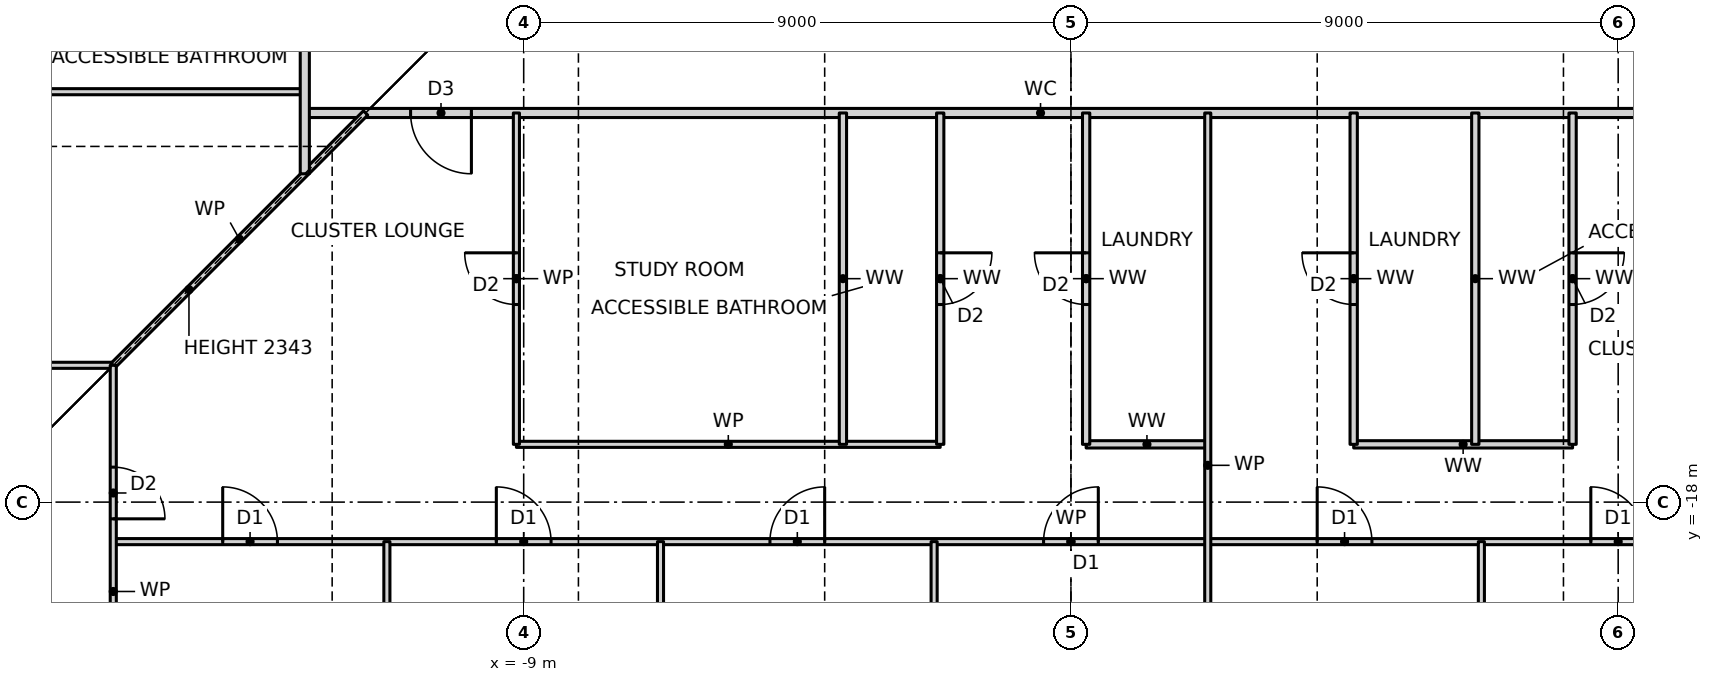
"""IFC4 building model, lengths in metres.
Left out: names, types, materials, properties, quantities, classifications, styles, units other than length and angle.
Written with IfcOpenShell. Run it as: python <this file> out.ifc"""

import sys

from ifc_helpers import new_model, si_unit, direction, frame, frame_2d, origin, place, context, subcontext, project, spatial, rectangle, extrude, element, fill, save


model = new_model("IFC4")
c1 = context("Model", 3, precision=1e-05, world=origin(), true_north=direction((0.0, 1.0)))
c2 = subcontext(c1, "Body", "Model", "MODEL_VIEW")
j1 = project(units=[si_unit("LENGTHUNIT", "METRE"), si_unit("PLANEANGLEUNIT", "RADIAN")], contexts=[c1])
p1 = place(None, origin())
s1 = spatial("IfcSite", under=j1, at=p1, CompositionType="ELEMENT")
p2 = place(p1, origin())
s2 = spatial("IfcBuilding", under=s1, at=p2, CompositionType="ELEMENT")
p3 = place(p2, frame((0.0, 0.0, 53.5)))
s3 = spatial("IfcBuildingStorey", under=s2, at=p3, CompositionType="ELEMENT", Elevation=53.5)
p4 = place(p3, frame((-15.75, -18.65, 0.0), z_axis=(0.0, 0.0, 1.0), x_axis=(1.0, 0.0, 0.0)))
e1 = element("IfcWall", 1, at=p4, inside=s3, PredefinedType="PARTITIONING", context=c2, shape_type="SweptSolid", body=[
    extrude(rectangle(XDim=31.5, YDim=0.1, at=frame_2d((15.75, 0.0))), origin(), (0.0, 0.0, 1.0), 3.27),
])
p5 = place(p4, frame((1.8, 0.0, 0.0)))
e2 = element("IfcOpeningElement", 2, at=p5, cuts=e1, PredefinedType="OPENING", context=c2, shape_type="SweptSolid", body=[
    extrude(rectangle(XDim=0.9, YDim=2.1, at=frame_2d((0.45, 1.05))), frame((0.0, 0.06, 0.0), z_axis=(0.0, -1.0, 0.0), x_axis=(1.0, 0.0, 0.0)), (0.0, 0.0, 1.0), 0.12),
])
p6 = place(p4, frame((6.3, 0.0, 0.0)))
e3 = element("IfcOpeningElement", 3, at=p6, cuts=e1, PredefinedType="OPENING", context=c2, shape_type="SweptSolid", body=[
    extrude(rectangle(XDim=0.9, YDim=2.1, at=frame_2d((0.45, 1.05))), frame((0.0, 0.06, 0.0), z_axis=(0.0, -1.0, 0.0), x_axis=(1.0, 0.0, 0.0)), (0.0, 0.0, 1.0), 0.12),
])
p7 = place(p4, frame((10.8, 0.0, 0.0)))
e4 = element("IfcOpeningElement", 4, at=p7, cuts=e1, PredefinedType="OPENING", context=c2, shape_type="SweptSolid", body=[
    extrude(rectangle(XDim=0.9, YDim=2.1, at=frame_2d((0.45, 1.05))), frame((0.0, 0.06, 0.0), z_axis=(0.0, -1.0, 0.0), x_axis=(1.0, 0.0, 0.0)), (0.0, 0.0, 1.0), 0.12),
])
p8 = place(p4, frame((15.3, 0.0, 0.0)))
e5 = element("IfcOpeningElement", 5, at=p8, cuts=e1, PredefinedType="OPENING", context=c2, shape_type="SweptSolid", body=[
    extrude(rectangle(XDim=0.9, YDim=2.1, at=frame_2d((0.45, 1.05))), frame((0.0, 0.06, 0.0), z_axis=(0.0, -1.0, 0.0), x_axis=(1.0, 0.0, 0.0)), (0.0, 0.0, 1.0), 0.12),
])
p9 = place(p4, frame((19.8, 0.0, 0.0)))
e6 = element("IfcOpeningElement", 6, at=p9, cuts=e1, PredefinedType="OPENING", context=c2, shape_type="SweptSolid", body=[
    extrude(rectangle(XDim=0.9, YDim=2.1, at=frame_2d((0.45, 1.05))), frame((0.0, 0.06, 0.0), z_axis=(0.0, -1.0, 0.0), x_axis=(1.0, 0.0, 0.0)), (0.0, 0.0, 1.0), 0.12),
])
p10 = place(p4, frame((24.3, 0.0, 0.0)))
e7 = element("IfcOpeningElement", 7, at=p10, cuts=e1, PredefinedType="OPENING", context=c2, shape_type="SweptSolid", body=[
    extrude(rectangle(XDim=0.9, YDim=2.1, at=frame_2d((0.45, 1.05))), frame((0.0, 0.06, 0.0), z_axis=(0.0, -1.0, 0.0), x_axis=(1.0, 0.0, 0.0)), (0.0, 0.0, 1.0), 0.12),
])
p11 = place(p4, frame((28.8, 0.0, 0.0)))
e8 = element("IfcOpeningElement", 8, at=p11, cuts=e1, PredefinedType="OPENING", context=c2, shape_type="SweptSolid", body=[
    extrude(rectangle(XDim=0.9, YDim=2.1, at=frame_2d((0.45, 1.05))), frame((0.0, 0.06, 0.0), z_axis=(0.0, -1.0, 0.0), x_axis=(1.0, 0.0, 0.0)), (0.0, 0.0, 1.0), 0.12),
])
p12 = place(p3, frame((-9.12, -17.05, 0.0), z_axis=(0.0, 0.0, 1.0), x_axis=(1.0, 0.0, 0.0)))
e9 = element("IfcWall", 9, at=p12, inside=s3, PredefinedType="PARTITIONING", context=c2, shape_type="SweptSolid", body=[
    extrude(rectangle(XDim=6.97, YDim=0.1, at=frame_2d((3.485, 0.0))), origin(), (0.0, 0.0, 1.0), 3.27),
])
p13 = place(p3, frame((0.25, -17.05, 0.0), z_axis=(0.0, 0.0, 1.0), x_axis=(1.0, 0.0, 0.0)))
e10 = element("IfcWall", 10, at=p13, inside=s3, PredefinedType="PARTITIONING", context=c2, shape_type="SweptSolid", body=[
    extrude(rectangle(XDim=2.0, YDim=0.12, at=frame_2d((1.0, 0.0))), origin(), (0.0, 0.0, 1.0), 3.27),
])
p14 = place(p3, frame((4.65, -17.05, 0.0), z_axis=(0.0, 0.0, 1.0), x_axis=(1.0, 0.0, 0.0)))
e11 = element("IfcWall", 11, at=p14, inside=s3, PredefinedType="PARTITIONING", context=c2, shape_type="SweptSolid", body=[
    extrude(rectangle(XDim=3.6, YDim=0.12, at=frame_2d((1.8, 0.0))), origin(), (0.0, 0.0, 1.0), 3.27),
])
p15 = place(p3, frame((-23.19, -15.75, 0.0), z_axis=(0.0, 0.0, 1.0), x_axis=(1.0, 0.0, 0.0)))
e12 = element("IfcWall", 12, at=p15, inside=s3, PredefinedType="PARTITIONING", context=c2, shape_type="SweptSolid", body=[
    extrude(rectangle(XDim=7.44, YDim=0.1, at=frame_2d((3.72, 0.0))), origin(), (0.0, 0.0, 1.0), 3.27),
])
p16 = place(p3, frame((-12.6, -11.6, 0.0), z_axis=(0.0, 0.0, 1.0), x_axis=(1.0, 0.0, 0.0)))
e13 = element("IfcWall", 13, at=p16, inside=s3, PredefinedType="PARTITIONING", context=c2, shape_type="SweptSolid", body=[
    extrude(rectangle(XDim=24.2, YDim=0.15, at=frame_2d((12.1, 0.0))), origin(), (0.0, 0.0, 1.0), 3.27),
])
p17 = place(p16, frame((1.74, 0.0, 0.0)))
e14 = element("IfcOpeningElement", 14, at=p17, cuts=e13, PredefinedType="OPENING", context=c2, shape_type="SweptSolid", body=[
    extrude(rectangle(XDim=1.0, YDim=2.1, at=frame_2d((0.5, 1.05))), frame((0.0, 0.085, 0.0), z_axis=(0.0, -1.0, 0.0), x_axis=(1.0, 0.0, 0.0)), (0.0, 0.0, 1.0), 0.17),
])
p18 = place(p16, frame((22.025, 0.0, 0.0)))
e15 = element("IfcOpeningElement", 15, at=p18, cuts=e13, PredefinedType="OPENING", context=c2, shape_type="SweptSolid", body=[
    extrude(rectangle(XDim=1.0, YDim=2.1, at=frame_2d((0.5, 1.05))), frame((0.0, 0.085, 0.0), z_axis=(0.0, -1.0, 0.0), x_axis=(1.0, 0.0, 0.0)), (0.0, 0.0, 1.0), 0.17),
])
p19 = place(p3, frame((-23.19, -11.25, 0.0), z_axis=(0.0, 0.0, 1.0), x_axis=(1.0, 0.0, 0.0)))
e16 = element("IfcWall", 16, at=p19, inside=s3, PredefinedType="PARTITIONING", context=c2, shape_type="SweptSolid", body=[
    extrude(rectangle(XDim=10.59, YDim=0.1, at=frame_2d((5.295, 0.0))), origin(), (0.0, 0.0, 1.0), 3.27),
])
p20 = place(p19, frame((4.915, 0.0, 0.0)))
e17 = element("IfcOpeningElement", 17, at=p20, cuts=e16, PredefinedType="OPENING", context=c2, shape_type="SweptSolid", body=[
    extrude(rectangle(XDim=0.85, YDim=2.1, at=frame_2d((0.425, 1.05))), frame((0.0, 0.06, 0.0), z_axis=(0.0, -1.0, 0.0), x_axis=(1.0, 0.0, 0.0)), (0.0, 0.0, 1.0), 0.12),
])
p21 = place(p3, frame((-15.75, -15.75, 0.0), z_axis=(0.0, 0.0, 1.0), x_axis=(0.707106781187, 0.707106781187, 0.0)))
e18 = element("IfcWall", 18, at=p21, inside=s3, PredefinedType="PARTITIONING", context=c2, shape_type="SweptSolid", body=[
    extrude(rectangle(XDim=5.869, YDim=0.1, at=frame_2d((2.935, 0.0))), origin(), (0.0, 0.0, 1.0), 2.343),
])
p22 = place(p3, frame((8.25, -17.05, 0.0), z_axis=(0.0, 0.0, 1.0), x_axis=(0.0, 1.0, 0.0)))
e19 = element("IfcWall", 19, at=p22, inside=s3, PredefinedType="PARTITIONING", context=c2, shape_type="SweptSolid", body=[
    extrude(rectangle(XDim=5.45, YDim=0.12, at=frame_2d((2.725, 0.0))), origin(), (0.0, 0.0, 1.0), 3.27),
])
p23 = place(p22, frame((2.3, 0.0, 0.0)))
e20 = element("IfcOpeningElement", 20, at=p23, cuts=e19, PredefinedType="OPENING", context=c2, shape_type="SweptSolid", body=[
    extrude(rectangle(XDim=0.85, YDim=2.1, at=frame_2d((0.425, 1.05))), frame((0.0, 0.07, 0.0), z_axis=(0.0, -1.0, 0.0), x_axis=(1.0, 0.0, 0.0)), (0.0, 0.0, 1.0), 0.14),
])
p24 = place(p3, frame((6.75, -23.19, 0.0), z_axis=(0.0, 0.0, 1.0), x_axis=(0.0, 1.0, 0.0)))
e21 = element("IfcWall", 21, at=p24, inside=s3, PredefinedType="PARTITIONING", context=c2, shape_type="SweptSolid", body=[
    extrude(rectangle(XDim=4.54, YDim=0.1, at=frame_2d((2.27, 0.0))), origin(), (0.0, 0.0, 1.0), 3.27),
])
p25 = place(p3, frame((6.65, -17.05, 0.0), z_axis=(0.0, 0.0, 1.0), x_axis=(0.0, 1.0, 0.0)))
e22 = element("IfcWall", 22, at=p25, inside=s3, PredefinedType="PARTITIONING", context=c2, shape_type="SweptSolid", body=[
    extrude(rectangle(XDim=5.45, YDim=0.12, at=frame_2d((2.725, 0.0))), origin(), (0.0, 0.0, 1.0), 3.27),
])
p26 = place(p3, frame((4.65, -17.05, 0.0), z_axis=(0.0, 0.0, 1.0), x_axis=(0.0, 1.0, 0.0)))
e23 = element("IfcWall", 23, at=p26, inside=s3, PredefinedType="PARTITIONING", context=c2, shape_type="SweptSolid", body=[
    extrude(rectangle(XDim=5.45, YDim=0.12, at=frame_2d((2.725, 0.0))), origin(), (0.0, 0.0, 1.0), 3.27),
])
p27 = place(p26, frame((2.3, 0.0, 0.0)))
e24 = element("IfcOpeningElement", 24, at=p27, cuts=e23, PredefinedType="OPENING", context=c2, shape_type="SweptSolid", body=[
    extrude(rectangle(XDim=0.85, YDim=2.1, at=frame_2d((0.425, 1.05))), frame((0.0, 0.07, 0.0), z_axis=(0.0, -1.0, 0.0), x_axis=(1.0, 0.0, 0.0)), (0.0, 0.0, 1.0), 0.14),
])
p28 = place(p3, frame((2.25, -23.19, 0.0), z_axis=(0.0, 0.0, 1.0), x_axis=(0.0, 1.0, 0.0)))
e25 = element("IfcWall", 25, at=p28, inside=s3, PredefinedType="PARTITIONING", context=c2, shape_type="SweptSolid", body=[
    extrude(rectangle(XDim=11.59, YDim=0.1, at=frame_2d((5.795, 0.0))), origin(), (0.0, 0.0, 1.0), 3.27),
])
p29 = place(p3, frame((0.25, -17.05, 0.0), z_axis=(0.0, 0.0, 1.0), x_axis=(0.0, 1.0, 0.0)))
e26 = element("IfcWall", 26, at=p29, inside=s3, PredefinedType="PARTITIONING", context=c2, shape_type="SweptSolid", body=[
    extrude(rectangle(XDim=5.45, YDim=0.12, at=frame_2d((2.725, 0.0))), origin(), (0.0, 0.0, 1.0), 3.27),
])
p30 = place(p29, frame((2.3, 0.0, 0.0)))
e27 = element("IfcOpeningElement", 27, at=p30, cuts=e26, PredefinedType="OPENING", context=c2, shape_type="SweptSolid", body=[
    extrude(rectangle(XDim=0.85, YDim=2.1, at=frame_2d((0.425, 1.05))), frame((0.0, 0.07, 0.0), z_axis=(0.0, -1.0, 0.0), x_axis=(1.0, 0.0, 0.0)), (0.0, 0.0, 1.0), 0.14),
])
p31 = place(p3, frame((-2.15, -17.05, 0.0), z_axis=(0.0, 0.0, 1.0), x_axis=(0.0, 1.0, 0.0)))
e28 = element("IfcWall", 28, at=p31, inside=s3, PredefinedType="PARTITIONING", context=c2, shape_type="SweptSolid", body=[
    extrude(rectangle(XDim=5.45, YDim=0.12, at=frame_2d((2.725, 0.0))), origin(), (0.0, 0.0, 1.0), 3.27),
])
p32 = place(p31, frame((2.3, 0.0, 0.0)))
e29 = element("IfcOpeningElement", 29, at=p32, cuts=e28, PredefinedType="OPENING", context=c2, shape_type="SweptSolid", body=[
    extrude(rectangle(XDim=0.85, YDim=2.1, at=frame_2d((0.425, 1.05))), frame((0.0, 0.07, 0.0), z_axis=(0.0, -1.0, 0.0), x_axis=(1.0, 0.0, 0.0)), (0.0, 0.0, 1.0), 0.14),
])
p33 = place(p3, frame((-2.25, -23.19, 0.0), z_axis=(0.0, 0.0, 1.0), x_axis=(0.0, 1.0, 0.0)))
e30 = element("IfcWall", 30, at=p33, inside=s3, PredefinedType="PARTITIONING", context=c2, shape_type="SweptSolid", body=[
    extrude(rectangle(XDim=4.54, YDim=0.1, at=frame_2d((2.27, 0.0))), origin(), (0.0, 0.0, 1.0), 3.27),
])
p34 = place(p3, frame((-3.75, -17.05, 0.0), z_axis=(0.0, 0.0, 1.0), x_axis=(0.0, 1.0, 0.0)))
e31 = element("IfcWall", 31, at=p34, inside=s3, PredefinedType="PARTITIONING", context=c2, shape_type="SweptSolid", body=[
    extrude(rectangle(XDim=5.45, YDim=0.12, at=frame_2d((2.725, 0.0))), origin(), (0.0, 0.0, 1.0), 3.27),
])
p35 = place(p3, frame((-6.75, -23.19, 0.0), z_axis=(0.0, 0.0, 1.0), x_axis=(0.0, 1.0, 0.0)))
e32 = element("IfcWall", 32, at=p35, inside=s3, PredefinedType="PARTITIONING", context=c2, shape_type="SweptSolid", body=[
    extrude(rectangle(XDim=4.54, YDim=0.1, at=frame_2d((2.27, 0.0))), origin(), (0.0, 0.0, 1.0), 3.27),
])
p36 = place(p3, frame((-9.12, -17.05, 0.0), z_axis=(0.0, 0.0, 1.0), x_axis=(0.0, 1.0, 0.0)))
e33 = element("IfcWall", 33, at=p36, inside=s3, PredefinedType="PARTITIONING", context=c2, shape_type="SweptSolid", body=[
    extrude(rectangle(XDim=5.45, YDim=0.1, at=frame_2d((2.725, 0.0))), origin(), (0.0, 0.0, 1.0), 3.27),
])
p37 = place(p36, frame((2.3, 0.0, 0.0)))
e34 = element("IfcOpeningElement", 34, at=p37, cuts=e33, PredefinedType="OPENING", context=c2, shape_type="SweptSolid", body=[
    extrude(rectangle(XDim=0.85, YDim=2.1, at=frame_2d((0.425, 1.05))), frame((0.0, 0.06, 0.0), z_axis=(0.0, -1.0, 0.0), x_axis=(1.0, 0.0, 0.0)), (0.0, 0.0, 1.0), 0.12),
])
p38 = place(p3, frame((-11.25, -23.19, 0.0), z_axis=(0.0, 0.0, 1.0), x_axis=(0.0, 1.0, 0.0)))
e35 = element("IfcWall", 35, at=p38, inside=s3, PredefinedType="PARTITIONING", context=c2, shape_type="SweptSolid", body=[
    extrude(rectangle(XDim=4.54, YDim=0.1, at=frame_2d((2.27, 0.0))), origin(), (0.0, 0.0, 1.0), 3.27),
])
p39 = place(p3, frame((-12.6, -12.6, 0.0), z_axis=(0.0, 0.0, 1.0), x_axis=(0.0, 1.0, 0.0)))
e36 = element("IfcWall", 36, at=p39, inside=s3, PredefinedType="PARTITIONING", context=c2, shape_type="SweptSolid", body=[
    extrude(rectangle(XDim=25.2, YDim=0.15, at=frame_2d((12.6, 0.0))), origin(), (0.0, 0.0, 1.0), 3.27),
])
p40 = place(p39, frame((7.15, 0.0, 0.0)))
e37 = element("IfcOpeningElement", 37, at=p40, cuts=e36, PredefinedType="OPENING", context=c2, shape_type="SweptSolid", body=[
    extrude(rectangle(XDim=1.0, YDim=2.1, at=frame_2d((0.5, 1.05))), frame((0.0, 0.085, 0.0), z_axis=(0.0, -1.0, 0.0), x_axis=(1.0, 0.0, 0.0)), (0.0, 0.0, 1.0), 0.17),
])
p41 = place(p3, frame((-15.75, -23.19, 0.0), z_axis=(0.0, 0.0, 1.0), x_axis=(0.0, 1.0, 0.0)))
e38 = element("IfcWall", 38, at=p41, inside=s3, PredefinedType="PARTITIONING", context=c2, shape_type="SweptSolid", body=[
    extrude(rectangle(XDim=7.44, YDim=0.1, at=frame_2d((3.72, 0.0))), origin(), (0.0, 0.0, 1.0), 3.27),
])
p42 = place(p41, frame((4.915, 0.0, 0.0)))
e39 = element("IfcOpeningElement", 39, at=p42, cuts=e38, PredefinedType="OPENING", context=c2, shape_type="SweptSolid", body=[
    extrude(rectangle(XDim=0.85, YDim=2.1, at=frame_2d((0.425, 1.05))), frame((0.0, 0.06, 0.0), z_axis=(0.0, -1.0, 0.0), x_axis=(1.0, 0.0, 0.0)), (0.0, 0.0, 1.0), 0.12),
])
p43 = place(p5, origin())
e40 = element("IfcDoor", 40, at=p43, inside=s3, OperationType="SINGLE_SWING_LEFT", PredefinedType="DOOR", context=c2, shape_type="SweptSolid", body=[
    extrude(rectangle(XDim=0.9, YDim=2.1, at=frame_2d((0.45, 1.05))), frame((0.0, 0.025, 0.0), z_axis=(0.0, -1.0, 0.0), x_axis=(1.0, 0.0, 0.0)), (0.0, 0.0, 1.0), 0.05),
])
fill(e2, e40)
p44 = place(p6, origin())
e41 = element("IfcDoor", 41, at=p44, inside=s3, OperationType="SINGLE_SWING_LEFT", PredefinedType="DOOR", context=c2, shape_type="SweptSolid", body=[
    extrude(rectangle(XDim=0.9, YDim=2.1, at=frame_2d((0.45, 1.05))), frame((0.0, 0.025, 0.0), z_axis=(0.0, -1.0, 0.0), x_axis=(1.0, 0.0, 0.0)), (0.0, 0.0, 1.0), 0.05),
])
fill(e3, e41)
p45 = place(p7, origin())
e42 = element("IfcDoor", 42, at=p45, inside=s3, OperationType="SINGLE_SWING_RIGHT", PredefinedType="DOOR", context=c2, shape_type="SweptSolid", body=[
    extrude(rectangle(XDim=0.9, YDim=2.1, at=frame_2d((0.45, 1.05))), frame((0.0, 0.025, 0.0), z_axis=(0.0, -1.0, 0.0), x_axis=(1.0, 0.0, 0.0)), (0.0, 0.0, 1.0), 0.05),
])
fill(e4, e42)
p46 = place(p8, origin())
e43 = element("IfcDoor", 43, at=p46, inside=s3, OperationType="SINGLE_SWING_RIGHT", PredefinedType="DOOR", context=c2, shape_type="SweptSolid", body=[
    extrude(rectangle(XDim=0.9, YDim=2.1, at=frame_2d((0.45, 1.05))), frame((0.0, 0.025, 0.0), z_axis=(0.0, -1.0, 0.0), x_axis=(1.0, 0.0, 0.0)), (0.0, 0.0, 1.0), 0.05),
])
fill(e5, e43)
p47 = place(p17, frame((1.0, 0.0, 0.0), z_axis=(0.0, 0.0, 1.0), x_axis=(-1.0, 0.0, 0.0)))
e44 = element("IfcDoor", 44, at=p47, inside=s3, OperationType="SINGLE_SWING_LEFT", PredefinedType="DOOR", context=c2, shape_type="SweptSolid", body=[
    extrude(rectangle(XDim=1.0, YDim=2.1, at=frame_2d((0.5, 1.05))), frame((0.0, 0.025, 0.0), z_axis=(0.0, -1.0, 0.0), x_axis=(1.0, 0.0, 0.0)), (0.0, 0.0, 1.0), 0.05),
])
fill(e14, e44)
p48 = place(p37, origin())
e45 = element("IfcDoor", 45, at=p48, inside=s3, OperationType="SINGLE_SWING_RIGHT", PredefinedType="DOOR", context=c2, shape_type="SweptSolid", body=[
    extrude(rectangle(XDim=0.85, YDim=2.1, at=frame_2d((0.425, 1.05))), frame((0.0, 0.025, 0.0), z_axis=(0.0, -1.0, 0.0), x_axis=(1.0, 0.0, 0.0)), (0.0, 0.0, 1.0), 0.05),
])
fill(e34, e45)
p49 = place(p32, frame((0.85, 0.0, 0.0), z_axis=(0.0, 0.0, 1.0), x_axis=(-1.0, 0.0, 0.0)))
e46 = element("IfcDoor", 46, at=p49, inside=s3, OperationType="SINGLE_SWING_LEFT", PredefinedType="DOOR", context=c2, shape_type="SweptSolid", body=[
    extrude(rectangle(XDim=0.85, YDim=2.1, at=frame_2d((0.425, 1.05))), frame((0.0, 0.025, 0.0), z_axis=(0.0, -1.0, 0.0), x_axis=(1.0, 0.0, 0.0)), (0.0, 0.0, 1.0), 0.05),
])
fill(e29, e46)
p50 = place(p30, origin())
e47 = element("IfcDoor", 47, at=p50, inside=s3, OperationType="SINGLE_SWING_RIGHT", PredefinedType="DOOR", context=c2, shape_type="SweptSolid", body=[
    extrude(rectangle(XDim=0.85, YDim=2.1, at=frame_2d((0.425, 1.05))), frame((0.0, 0.025, 0.0), z_axis=(0.0, -1.0, 0.0), x_axis=(1.0, 0.0, 0.0)), (0.0, 0.0, 1.0), 0.05),
])
fill(e27, e47)
p51 = place(p9, origin())
e48 = element("IfcDoor", 48, at=p51, inside=s3, OperationType="SINGLE_SWING_LEFT", PredefinedType="DOOR", context=c2, shape_type="SweptSolid", body=[
    extrude(rectangle(XDim=0.9, YDim=2.1, at=frame_2d((0.45, 1.05))), frame((0.0, 0.025, 0.0), z_axis=(0.0, -1.0, 0.0), x_axis=(1.0, 0.0, 0.0)), (0.0, 0.0, 1.0), 0.05),
])
fill(e6, e48)
p52 = place(p10, origin())
e49 = element("IfcDoor", 49, at=p52, inside=s3, OperationType="SINGLE_SWING_LEFT", PredefinedType="DOOR", context=c2, shape_type="SweptSolid", body=[
    extrude(rectangle(XDim=0.9, YDim=2.1, at=frame_2d((0.45, 1.05))), frame((0.0, 0.025, 0.0), z_axis=(0.0, -1.0, 0.0), x_axis=(1.0, 0.0, 0.0)), (0.0, 0.0, 1.0), 0.05),
])
fill(e7, e49)
p53 = place(p27, origin())
e50 = element("IfcDoor", 50, at=p53, inside=s3, OperationType="SINGLE_SWING_RIGHT", PredefinedType="DOOR", context=c2, shape_type="SweptSolid", body=[
    extrude(rectangle(XDim=0.85, YDim=2.1, at=frame_2d((0.425, 1.05))), frame((0.0, 0.025, 0.0), z_axis=(0.0, -1.0, 0.0), x_axis=(1.0, 0.0, 0.0)), (0.0, 0.0, 1.0), 0.05),
])
fill(e24, e50)
p54 = place(p23, frame((0.85, 0.0, 0.0), z_axis=(0.0, 0.0, 1.0), x_axis=(-1.0, 0.0, 0.0)))
e51 = element("IfcDoor", 51, at=p54, inside=s3, OperationType="SINGLE_SWING_LEFT", PredefinedType="DOOR", context=c2, shape_type="SweptSolid", body=[
    extrude(rectangle(XDim=0.85, YDim=2.1, at=frame_2d((0.425, 1.05))), frame((0.0, 0.025, 0.0), z_axis=(0.0, -1.0, 0.0), x_axis=(1.0, 0.0, 0.0)), (0.0, 0.0, 1.0), 0.05),
])
fill(e20, e51)
p55 = place(p42, frame((0.85, 0.0, 0.0), z_axis=(0.0, 0.0, 1.0), x_axis=(-1.0, 0.0, 0.0)))
e52 = element("IfcDoor", 52, at=p55, inside=s3, OperationType="SINGLE_SWING_RIGHT", PredefinedType="DOOR", context=c2, shape_type="SweptSolid", body=[
    extrude(rectangle(XDim=0.85, YDim=2.1, at=frame_2d((0.425, 1.05))), frame((0.0, 0.025, 0.0), z_axis=(0.0, -1.0, 0.0), x_axis=(1.0, 0.0, 0.0)), (0.0, 0.0, 1.0), 0.05),
])
fill(e39, e52)
save(model, sys.argv[1])
